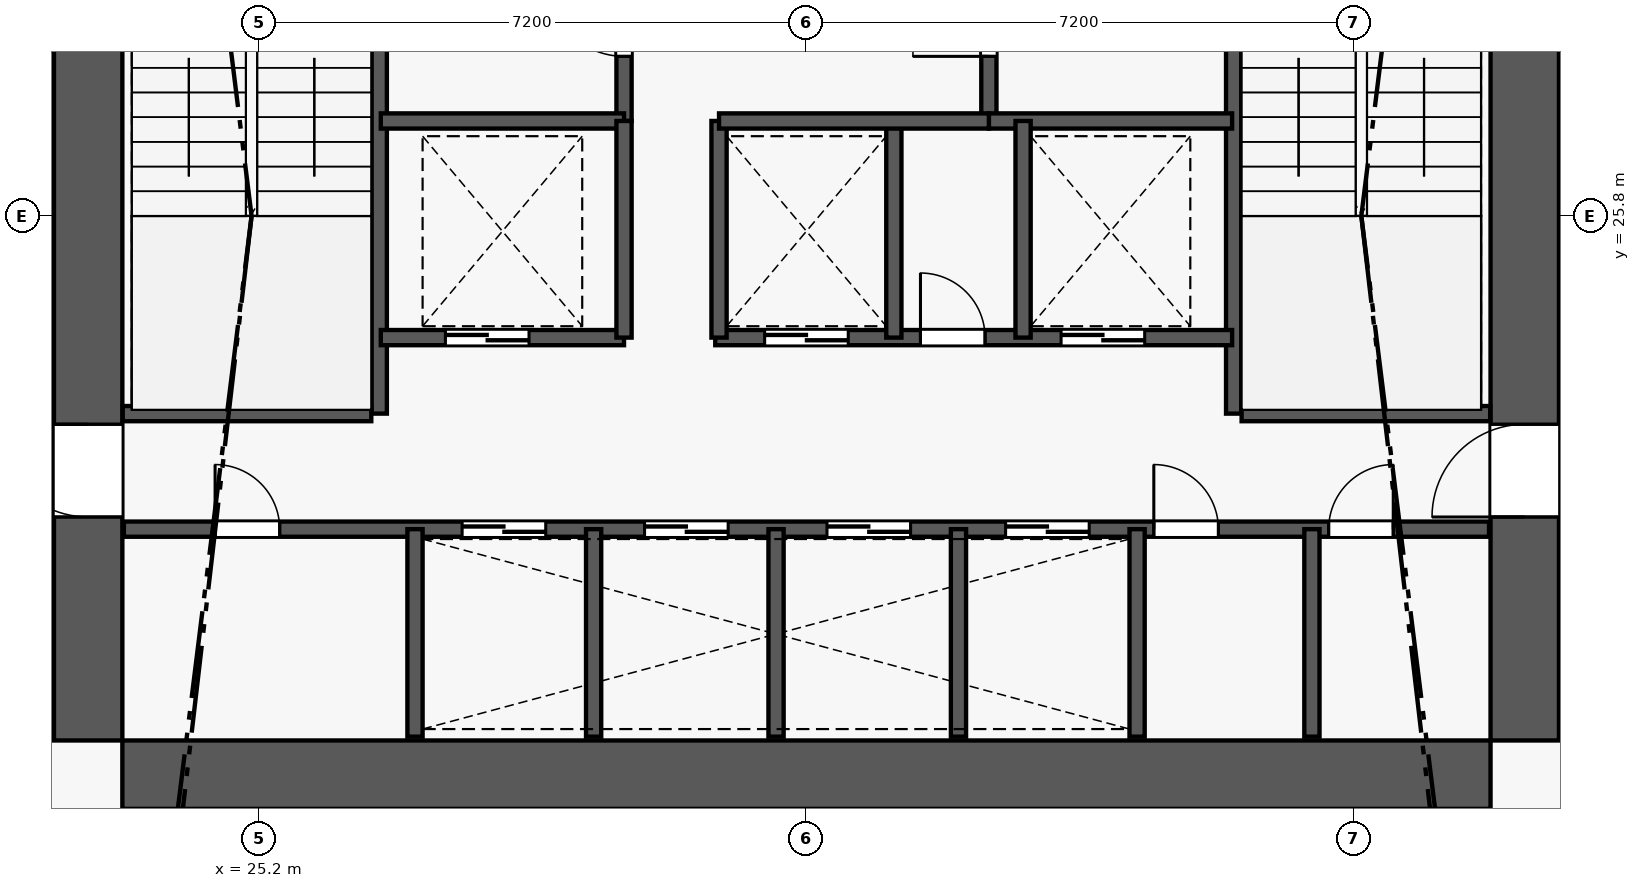
"""IFC4 building model, lengths in metres.
Left out: names, types, materials, properties, quantities, classifications, styles, units other than length and angle.
Written with IfcOpenShell. Run it as: python <this file> out.ifc"""

import sys

from ifc_helpers import new_model, si_unit, direction, frame, frame_2d, origin, origin_2d, place, context, subcontext, project, spatial, rectangle, extrude, element, fill, save


model = new_model("IFC4")
c1 = context("Model", 3, precision=1e-05, world=origin(), true_north=direction((0.0, 1.0)))
c2 = subcontext(c1, "Body", "Model", "MODEL_VIEW")
j1 = project(units=[si_unit("LENGTHUNIT", "METRE"), si_unit("PLANEANGLEUNIT", "RADIAN")], contexts=[c1])
p1 = place(None, origin())
s1 = spatial("IfcSite", under=j1, at=p1, CompositionType="ELEMENT")
p2 = place(p1, origin())
s2 = spatial("IfcBuilding", under=s1, at=p2, CompositionType="ELEMENT")
p3 = place(p2, origin())
s3 = spatial("IfcBuildingStorey", under=s2, at=p3, CompositionType="ELEMENT", Elevation=0.0)
for number, where, z_axis, x_axis in (
    (1, (22.95, 18.45, 0.0), (0.0, 0.0, 1.0), (1.0, 0.0, 0.0)),
    (2, (41.85, 18.45, 0.0), (0.0, 0.0, 1.0), (1.0, 0.0, 0.0)),
):
    element("IfcColumn", number, at=place(p3, frame(where, z_axis=z_axis, x_axis=x_axis)), inside=s3, PredefinedType="COLUMN", context=c2, shape_type="SweptSolid", body=[
        extrude(rectangle(XDim=0.9, YDim=0.9, at=origin_2d()), origin(), (0.0, 0.0, 1.0), 6.0),
    ])
p4 = place(p3, frame((23.4, 18.45, 0.0), z_axis=(0.0, 0.0, 1.0), x_axis=(1.0, 0.0, 0.0)))
e3 = element("IfcWall", 3, at=p4, inside=s3, PredefinedType="SHEAR", context=c2, shape_type="SweptSolid", body=[
    extrude(rectangle(XDim=18.0, YDim=0.9, at=frame_2d((9.0, 0.0))), origin(), (0.0, 0.0, 1.0), 5.75),
])
p5 = place(p3, frame((22.95, 18.9, 0.0), z_axis=(0.0, 0.0, 1.0), x_axis=(0.0, 1.0, 0.0)))
e4 = element("IfcWall", 4, at=p5, inside=s3, PredefinedType="SHEAR", context=c2, shape_type="SweptSolid", body=[
    extrude(rectangle(XDim=14.0, YDim=0.9, at=frame_2d((7.0, 0.0))), origin(), (0.0, 0.0, 1.0), 5.75),
])
p6 = place(p5, frame((2.94, 0.0, 0.0)))
e5 = element("IfcOpeningElement", 5, at=p6, cuts=e4, PredefinedType="OPENING", context=c2, shape_type="SweptSolid", body=[
    extrude(rectangle(XDim=1.22, YDim=2.25, at=frame_2d((0.61, 1.125))), frame((0.0, 0.46, 0.0), z_axis=(0.0, -1.0, 0.0), x_axis=(1.0, 0.0, 0.0)), (0.0, 0.0, 1.0), 0.92),
])
p7 = place(p3, frame((41.85, 18.9, 0.0), z_axis=(0.0, 0.0, 1.0), x_axis=(0.0, 1.0, 0.0)))
e6 = element("IfcWall", 6, at=p7, inside=s3, PredefinedType="SHEAR", context=c2, shape_type="SweptSolid", body=[
    extrude(rectangle(XDim=14.0, YDim=0.9, at=frame_2d((7.0, 0.0))), origin(), (0.0, 0.0, 1.0), 5.75),
])
p8 = place(p7, frame((2.94, 0.0, 0.0)))
e7 = element("IfcOpeningElement", 7, at=p8, cuts=e6, PredefinedType="OPENING", context=c2, shape_type="SweptSolid", body=[
    extrude(rectangle(XDim=1.22, YDim=2.25, at=frame_2d((0.61, 1.125))), frame((0.0, 0.46, 0.0), z_axis=(0.0, -1.0, 0.0), x_axis=(1.0, 0.0, 0.0)), (0.0, 0.0, 1.0), 0.92),
])
p9 = place(p3, frame((26.78, 23.2, 0.0), z_axis=(0.0, 0.0, 1.0), x_axis=(0.0, 1.0, 0.0)))
e8 = element("IfcWall", 8, at=p9, inside=s3, PredefinedType="SHEAR", context=c2, shape_type="SweptSolid", body=[
    extrude(rectangle(XDim=6.78, YDim=0.2, at=frame_2d((3.39, 0.0))), origin(), (0.0, 0.0, 1.0), 6.0),
])
p10 = place(p9, frame((5.32, 0.0, 0.0)))
e9 = element("IfcOpeningElement", 9, at=p10, cuts=e8, PredefinedType="OPENING", context=c2, shape_type="SweptSolid", body=[
    extrude(rectangle(XDim=1.05, YDim=2.15, at=frame_2d((0.525, 1.075))), frame((0.0, 0.11, 0.0), z_axis=(0.0, -1.0, 0.0), x_axis=(1.0, 0.0, 0.0)), (0.0, 0.0, 1.0), 0.22),
])
p11 = place(p3, frame((23.405, 23.2, 0.0), z_axis=(0.0, 0.0, 1.0), x_axis=(1.0, 0.0, 0.0)))
e10 = element("IfcWall", 10, at=p11, inside=s3, PredefinedType="PLUMBINGWALL", context=c2, shape_type="SweptSolid", body=[
    extrude(rectangle(XDim=3.27, YDim=0.2, at=frame_2d((1.635, 0.0))), origin(), (0.0, 0.0, 1.0), 5.75),
])
p12 = place(p3, frame((38.02, 23.2, 0.0), z_axis=(0.0, 0.0, 1.0), x_axis=(0.0, 1.0, 0.0)))
e11 = element("IfcWall", 11, at=p12, inside=s3, PredefinedType="SHEAR", context=c2, shape_type="SweptSolid", body=[
    extrude(rectangle(XDim=6.78, YDim=0.2, at=frame_2d((3.39, 0.0))), origin(), (0.0, 0.0, 1.0), 6.0),
])
p13 = place(p12, frame((5.32, 0.0, 0.0)))
e12 = element("IfcOpeningElement", 12, at=p13, cuts=e11, PredefinedType="OPENING", context=c2, shape_type="SweptSolid", body=[
    extrude(rectangle(XDim=1.05, YDim=2.15, at=frame_2d((0.525, 1.075))), frame((0.0, 0.11, 0.0), z_axis=(0.0, -1.0, 0.0), x_axis=(1.0, 0.0, 0.0)), (0.0, 0.0, 1.0), 0.22),
])
p14 = place(p3, frame((38.125, 23.2, 0.0), z_axis=(0.0, 0.0, 1.0), x_axis=(1.0, 0.0, 0.0)))
e13 = element("IfcWall", 13, at=p14, inside=s3, PredefinedType="PLUMBINGWALL", context=c2, shape_type="SweptSolid", body=[
    extrude(rectangle(XDim=3.27, YDim=0.2, at=frame_2d((1.635, 0.0))), origin(), (0.0, 0.0, 1.0), 5.75),
])
p15 = place(p3, frame((30.0, 27.05, 0.0), z_axis=(0.0, 0.0, 1.0), x_axis=(0.0, 1.0, 0.0)))
e14 = element("IfcWall", 14, at=p15, inside=s3, PredefinedType="PLUMBINGWALL", context=c2, shape_type="SweptSolid", body=[
    extrude(rectangle(XDim=2.75, YDim=0.2, at=frame_2d((1.375, 0.0))), origin(), (0.0, 0.0, 1.0), 5.75),
])
p16 = place(p15, frame((0.85, 0.0, 0.0)))
e15 = element("IfcOpeningElement", 15, at=p16, cuts=e14, PredefinedType="OPENING", context=c2, shape_type="SweptSolid", body=[
    extrude(rectangle(XDim=1.0, YDim=2.15, at=frame_2d((0.5, 1.075))), frame((0.0, 0.11, 0.0), z_axis=(0.0, -1.0, 0.0), x_axis=(1.0, 0.0, 0.0)), (0.0, 0.0, 1.0), 0.22),
])
p17 = place(p3, frame((26.8, 27.05, 0.0), z_axis=(0.0, 0.0, 1.0), x_axis=(1.0, 0.0, 0.0)))
e16 = element("IfcWall", 16, at=p17, inside=s3, PredefinedType="PLUMBINGWALL", context=c2, shape_type="SweptSolid", body=[
    extrude(rectangle(XDim=3.2, YDim=0.2, at=frame_2d((1.6, 0.0))), origin(), (0.0, 0.0, 1.0), 5.75),
])
p18 = place(p3, frame((34.8, 27.05, 0.0), z_axis=(0.0, 0.0, 1.0), x_axis=(0.0, 1.0, 0.0)))
e17 = element("IfcWall", 17, at=p18, inside=s3, PredefinedType="PLUMBINGWALL", context=c2, shape_type="SweptSolid", body=[
    extrude(rectangle(XDim=2.75, YDim=0.2, at=frame_2d((1.375, 0.0))), origin(), (0.0, 0.0, 1.0), 5.75),
])
p19 = place(p18, frame((0.85, 0.0, 0.0)))
e18 = element("IfcOpeningElement", 18, at=p19, cuts=e17, PredefinedType="OPENING", context=c2, shape_type="SweptSolid", body=[
    extrude(rectangle(XDim=1.0, YDim=2.15, at=frame_2d((0.5, 1.075))), frame((0.0, 0.11, 0.0), z_axis=(0.0, -1.0, 0.0), x_axis=(1.0, 0.0, 0.0)), (0.0, 0.0, 1.0), 0.22),
])
p20 = place(p3, frame((34.8, 27.05, 0.0), z_axis=(0.0, 0.0, 1.0), x_axis=(1.0, 0.0, 0.0)))
e19 = element("IfcWall", 19, at=p20, inside=s3, PredefinedType="PLUMBINGWALL", context=c2, shape_type="SweptSolid", body=[
    extrude(rectangle(XDim=3.2, YDim=0.2, at=frame_2d((1.6, 0.0))), origin(), (0.0, 0.0, 1.0), 5.75),
])
p21 = place(p3, frame((26.8, 24.2, 0.0), z_axis=(0.0, 0.0, 1.0), x_axis=(1.0, 0.0, 0.0)))
e20 = element("IfcWall", 20, at=p21, inside=s3, PredefinedType="PLUMBINGWALL", context=c2, shape_type="SweptSolid", body=[
    extrude(rectangle(XDim=3.2, YDim=0.2, at=frame_2d((1.6, 0.0))), origin(), (0.0, 0.0, 1.0), 5.75),
])
p22 = place(p21, frame((0.85, 0.0, 0.0)))
e21 = element("IfcOpeningElement", 21, at=p22, cuts=e20, PredefinedType="OPENING", context=c2, shape_type="SweptSolid", body=[
    extrude(rectangle(XDim=1.1, YDim=2.2, at=frame_2d((0.55, 1.1))), frame((0.0, 0.11, 0.0), z_axis=(0.0, -1.0, 0.0), x_axis=(1.0, 0.0, 0.0)), (0.0, 0.0, 1.0), 0.22),
])
p23 = place(p3, frame((30.0, 24.2, 0.0), z_axis=(0.0, 0.0, 1.0), x_axis=(0.0, 1.0, 0.0)))
e22 = element("IfcWall", 22, at=p23, inside=s3, PredefinedType="PLUMBINGWALL", context=c2, shape_type="SweptSolid", body=[
    extrude(rectangle(XDim=2.85, YDim=0.2, at=frame_2d((1.425, 0.0))), origin(), (0.0, 0.0, 1.0), 5.75),
])
p24 = place(p3, frame((31.2, 24.2, 0.0), z_axis=(0.0, 0.0, 1.0), x_axis=(1.0, 0.0, 0.0)))
e23 = element("IfcWall", 23, at=p24, inside=s3, PredefinedType="PLUMBINGWALL", context=c2, shape_type="SweptSolid", body=[
    extrude(rectangle(XDim=6.8, YDim=0.2, at=frame_2d((3.4, 0.0))), origin(), (0.0, 0.0, 1.0), 5.75),
])
p25 = place(p24, frame((0.65, 0.0, 0.0)))
e24 = element("IfcOpeningElement", 24, at=p25, cuts=e23, PredefinedType="OPENING", context=c2, shape_type="SweptSolid", body=[
    extrude(rectangle(XDim=1.1, YDim=2.2, at=frame_2d((0.55, 1.1))), frame((0.0, 0.11, 0.0), z_axis=(0.0, -1.0, 0.0), x_axis=(1.0, 0.0, 0.0)), (0.0, 0.0, 1.0), 0.22),
])
p26 = place(p24, frame((2.7, 0.0, 0.0)))
e25 = element("IfcOpeningElement", 25, at=p26, cuts=e23, PredefinedType="OPENING", context=c2, shape_type="SweptSolid", body=[
    extrude(rectangle(XDim=0.85, YDim=2.05, at=frame_2d((0.425, 1.025))), frame((0.0, 0.11, 0.0), z_axis=(0.0, -1.0, 0.0), x_axis=(1.0, 0.0, 0.0)), (0.0, 0.0, 1.0), 0.22),
])
p27 = place(p24, frame((4.55, 0.0, 0.0)))
e26 = element("IfcOpeningElement", 26, at=p27, cuts=e23, PredefinedType="OPENING", context=c2, shape_type="SweptSolid", body=[
    extrude(rectangle(XDim=1.1, YDim=2.2, at=frame_2d((0.55, 1.1))), frame((0.0, 0.11, 0.0), z_axis=(0.0, -1.0, 0.0), x_axis=(1.0, 0.0, 0.0)), (0.0, 0.0, 1.0), 0.22),
])
for number, where, z_axis, x_axis in (
    (27, (31.25, 24.2, 0.0), (0.0, 0.0, 1.0), (0.0, 1.0, 0.0)),
    (28, (33.55, 24.2, 0.0), (0.0, 0.0, 1.0), (0.0, 1.0, 0.0)),
    (29, (35.25, 24.2, 0.0), (0.0, 0.0, 1.0), (0.0, 1.0, 0.0)),
):
    element("IfcWall", number, at=place(p3, frame(where, z_axis=z_axis, x_axis=x_axis)), inside=s3, PredefinedType="PLUMBINGWALL", context=c2, shape_type="SweptSolid", body=[
        extrude(rectangle(XDim=2.85, YDim=0.2, at=frame_2d((1.425, 0.0))), origin(), (0.0, 0.0, 1.0), 5.75),
    ])
p28 = place(p3, frame((31.25, 27.05, 0.0), z_axis=(0.0, 0.0, 1.0), x_axis=(1.0, 0.0, 0.0)))
e30 = element("IfcWall", 30, at=p28, inside=s3, PredefinedType="PLUMBINGWALL", context=c2, shape_type="SweptSolid", body=[
    extrude(rectangle(XDim=3.55, YDim=0.2, at=frame_2d((1.775, 0.0))), origin(), (0.0, 0.0, 1.0), 5.75),
])
p29 = place(p3, frame((23.42, 21.68, 0.0), z_axis=(0.0, 0.0, 1.0), x_axis=(1.0, 0.0, 0.0)))
e31 = element("IfcWall", 31, at=p29, inside=s3, PredefinedType="PLUMBINGWALL", context=c2, shape_type="SweptSolid", body=[
    extrude(rectangle(XDim=17.96, YDim=0.2, at=frame_2d((8.98, 0.0))), origin(), (0.0, 0.0, 1.0), 5.75),
])
p30 = place(p29, frame((4.45, 0.0, 0.0)))
e32 = element("IfcOpeningElement", 32, at=p30, cuts=e31, PredefinedType="OPENING", context=c2, shape_type="SweptSolid", body=[
    extrude(rectangle(XDim=1.1, YDim=2.2, at=frame_2d((0.55, 1.1))), frame((0.0, 0.11, 0.0), z_axis=(0.0, -1.0, 0.0), x_axis=(1.0, 0.0, 0.0)), (0.0, 0.0, 1.0), 0.22),
])
p31 = place(p29, frame((6.85, 0.0, 0.0)))
e33 = element("IfcOpeningElement", 33, at=p31, cuts=e31, PredefinedType="OPENING", context=c2, shape_type="SweptSolid", body=[
    extrude(rectangle(XDim=1.1, YDim=2.2, at=frame_2d((0.55, 1.1))), frame((0.0, 0.11, 0.0), z_axis=(0.0, -1.0, 0.0), x_axis=(1.0, 0.0, 0.0)), (0.0, 0.0, 1.0), 0.22),
])
p32 = place(p29, frame((9.25, 0.0, 0.0)))
e34 = element("IfcOpeningElement", 34, at=p32, cuts=e31, PredefinedType="OPENING", context=c2, shape_type="SweptSolid", body=[
    extrude(rectangle(XDim=1.1, YDim=2.2, at=frame_2d((0.55, 1.1))), frame((0.0, 0.11, 0.0), z_axis=(0.0, -1.0, 0.0), x_axis=(1.0, 0.0, 0.0)), (0.0, 0.0, 1.0), 0.22),
])
p33 = place(p29, frame((11.6, 0.0, 0.0)))
e35 = element("IfcOpeningElement", 35, at=p33, cuts=e31, PredefinedType="OPENING", context=c2, shape_type="SweptSolid", body=[
    extrude(rectangle(XDim=1.1, YDim=2.2, at=frame_2d((0.55, 1.1))), frame((0.0, 0.11, 0.0), z_axis=(0.0, -1.0, 0.0), x_axis=(1.0, 0.0, 0.0)), (0.0, 0.0, 1.0), 0.22),
])
p34 = place(p29, frame((1.2, 0.0, 0.0)))
e36 = element("IfcOpeningElement", 36, at=p34, cuts=e31, PredefinedType="OPENING", context=c2, shape_type="SweptSolid", body=[
    extrude(rectangle(XDim=0.85, YDim=2.05, at=frame_2d((0.425, 1.025))), frame((0.0, 0.11, 0.0), z_axis=(0.0, -1.0, 0.0), x_axis=(1.0, 0.0, 0.0)), (0.0, 0.0, 1.0), 0.22),
])
p35 = place(p29, frame((13.55, 0.0, 0.0)))
e37 = element("IfcOpeningElement", 37, at=p35, cuts=e31, PredefinedType="OPENING", context=c2, shape_type="SweptSolid", body=[
    extrude(rectangle(XDim=0.85, YDim=2.05, at=frame_2d((0.425, 1.025))), frame((0.0, 0.11, 0.0), z_axis=(0.0, -1.0, 0.0), x_axis=(1.0, 0.0, 0.0)), (0.0, 0.0, 1.0), 0.22),
])
p36 = place(p29, frame((15.85, 0.0, 0.0)))
e38 = element("IfcOpeningElement", 38, at=p36, cuts=e31, PredefinedType="OPENING", context=c2, shape_type="SweptSolid", body=[
    extrude(rectangle(XDim=0.85, YDim=2.05, at=frame_2d((0.425, 1.025))), frame((0.0, 0.11, 0.0), z_axis=(0.0, -1.0, 0.0), x_axis=(1.0, 0.0, 0.0)), (0.0, 0.0, 1.0), 0.22),
])
for number, where, z_axis, x_axis in (
    (39, (27.25, 18.95, 0.0), (0.0, 0.0, 1.0), (0.0, 1.0, 0.0)),
    (40, (29.6, 18.95, 0.0), (0.0, 0.0, 1.0), (0.0, 1.0, 0.0)),
    (41, (32.0, 18.95, 0.0), (0.0, 0.0, 1.0), (0.0, 1.0, 0.0)),
    (42, (34.4, 18.95, 0.0), (0.0, 0.0, 1.0), (0.0, 1.0, 0.0)),
    (43, (36.75, 18.95, 0.0), (0.0, 0.0, 1.0), (0.0, 1.0, 0.0)),
    (44, (39.05, 18.95, 0.0), (0.0, 0.0, 1.0), (0.0, 1.0, 0.0)),
):
    element("IfcWall", number, at=place(p3, frame(where, z_axis=z_axis, x_axis=x_axis)), inside=s3, PredefinedType="PLUMBINGWALL", context=c2, shape_type="SweptSolid", body=[
        extrude(rectangle(XDim=2.73, YDim=0.2, at=frame_2d((1.365, 0.0))), origin(), (0.0, 0.0, 1.0), 5.75),
    ])
p37 = place(p6, origin())
e45 = element("IfcDoor", 45, at=p37, inside=s3, OperationType="SINGLE_SWING_RIGHT", PredefinedType="DOOR", context=c2, shape_type="SweptSolid", body=[
    extrude(rectangle(XDim=1.22, YDim=2.25, at=frame_2d((0.61, 1.125))), frame((0.0, 0.025, 0.0), z_axis=(0.0, -1.0, 0.0), x_axis=(1.0, 0.0, 0.0)), (0.0, 0.0, 1.0), 0.05),
])
fill(e5, e45)
p38 = place(p8, origin())
e46 = element("IfcDoor", 46, at=p38, inside=s3, OperationType="SINGLE_SWING_LEFT", PredefinedType="DOOR", context=c2, shape_type="SweptSolid", body=[
    extrude(rectangle(XDim=1.22, YDim=2.25, at=frame_2d((0.61, 1.125))), frame((0.0, 0.025, 0.0), z_axis=(0.0, -1.0, 0.0), x_axis=(1.0, 0.0, 0.0)), (0.0, 0.0, 1.0), 0.05),
])
fill(e7, e46)
p39 = place(p16, origin())
e47 = element("IfcDoor", 47, at=p39, inside=s3, OperationType="SINGLE_SWING_RIGHT", PredefinedType="DOOR", context=c2, shape_type="SweptSolid", body=[
    extrude(rectangle(XDim=1.0, YDim=2.15, at=frame_2d((0.5, 1.075))), frame((0.0, 0.025, 0.0), z_axis=(0.0, -1.0, 0.0), x_axis=(1.0, 0.0, 0.0)), (0.0, 0.0, 1.0), 0.05),
])
fill(e15, e47)
p40 = place(p19, origin())
e48 = element("IfcDoor", 48, at=p40, inside=s3, OperationType="SINGLE_SWING_LEFT", PredefinedType="DOOR", context=c2, shape_type="SweptSolid", body=[
    extrude(rectangle(XDim=1.0, YDim=2.15, at=frame_2d((0.5, 1.075))), frame((0.0, 0.025, 0.0), z_axis=(0.0, -1.0, 0.0), x_axis=(1.0, 0.0, 0.0)), (0.0, 0.0, 1.0), 0.05),
])
fill(e18, e48)
p41 = place(p22, origin())
e49 = element("IfcDoor", 49, at=p41, inside=s3, OperationType="DOUBLE_DOOR_SLIDING", PredefinedType="DOOR", context=c2, shape_type="SweptSolid", body=[
    extrude(rectangle(XDim=1.1, YDim=2.2, at=frame_2d((0.55, 1.1))), frame((0.0, 0.025, 0.0), z_axis=(0.0, -1.0, 0.0), x_axis=(1.0, 0.0, 0.0)), (0.0, 0.0, 1.0), 0.05),
])
fill(e21, e49)
p42 = place(p25, origin())
e50 = element("IfcDoor", 50, at=p42, inside=s3, OperationType="DOUBLE_DOOR_SLIDING", PredefinedType="DOOR", context=c2, shape_type="SweptSolid", body=[
    extrude(rectangle(XDim=1.1, YDim=2.2, at=frame_2d((0.55, 1.1))), frame((0.0, 0.025, 0.0), z_axis=(0.0, -1.0, 0.0), x_axis=(1.0, 0.0, 0.0)), (0.0, 0.0, 1.0), 0.05),
])
fill(e24, e50)
p43 = place(p26, origin())
e51 = element("IfcDoor", 51, at=p43, inside=s3, OperationType="SINGLE_SWING_LEFT", PredefinedType="DOOR", context=c2, shape_type="SweptSolid", body=[
    extrude(rectangle(XDim=0.85, YDim=2.05, at=frame_2d((0.425, 1.025))), frame((0.0, 0.025, 0.0), z_axis=(0.0, -1.0, 0.0), x_axis=(1.0, 0.0, 0.0)), (0.0, 0.0, 1.0), 0.05),
])
fill(e25, e51)
p44 = place(p27, origin())
e52 = element("IfcDoor", 52, at=p44, inside=s3, OperationType="DOUBLE_DOOR_SLIDING", PredefinedType="DOOR", context=c2, shape_type="SweptSolid", body=[
    extrude(rectangle(XDim=1.1, YDim=2.2, at=frame_2d((0.55, 1.1))), frame((0.0, 0.025, 0.0), z_axis=(0.0, -1.0, 0.0), x_axis=(1.0, 0.0, 0.0)), (0.0, 0.0, 1.0), 0.05),
])
fill(e26, e52)
p45 = place(p30, origin())
e53 = element("IfcDoor", 53, at=p45, inside=s3, OperationType="DOUBLE_DOOR_SLIDING", PredefinedType="DOOR", context=c2, shape_type="SweptSolid", body=[
    extrude(rectangle(XDim=1.1, YDim=2.2, at=frame_2d((0.55, 1.1))), frame((0.0, 0.025, 0.0), z_axis=(0.0, -1.0, 0.0), x_axis=(1.0, 0.0, 0.0)), (0.0, 0.0, 1.0), 0.05),
])
fill(e32, e53)
p46 = place(p31, origin())
e54 = element("IfcDoor", 54, at=p46, inside=s3, OperationType="DOUBLE_DOOR_SLIDING", PredefinedType="DOOR", context=c2, shape_type="SweptSolid", body=[
    extrude(rectangle(XDim=1.1, YDim=2.2, at=frame_2d((0.55, 1.1))), frame((0.0, 0.025, 0.0), z_axis=(0.0, -1.0, 0.0), x_axis=(1.0, 0.0, 0.0)), (0.0, 0.0, 1.0), 0.05),
])
fill(e33, e54)
p47 = place(p32, origin())
e55 = element("IfcDoor", 55, at=p47, inside=s3, OperationType="DOUBLE_DOOR_SLIDING", PredefinedType="DOOR", context=c2, shape_type="SweptSolid", body=[
    extrude(rectangle(XDim=1.1, YDim=2.2, at=frame_2d((0.55, 1.1))), frame((0.0, 0.025, 0.0), z_axis=(0.0, -1.0, 0.0), x_axis=(1.0, 0.0, 0.0)), (0.0, 0.0, 1.0), 0.05),
])
fill(e34, e55)
p48 = place(p33, origin())
e56 = element("IfcDoor", 56, at=p48, inside=s3, OperationType="DOUBLE_DOOR_SLIDING", PredefinedType="DOOR", context=c2, shape_type="SweptSolid", body=[
    extrude(rectangle(XDim=1.1, YDim=2.2, at=frame_2d((0.55, 1.1))), frame((0.0, 0.025, 0.0), z_axis=(0.0, -1.0, 0.0), x_axis=(1.0, 0.0, 0.0)), (0.0, 0.0, 1.0), 0.05),
])
fill(e35, e56)
p49 = place(p34, origin())
e57 = element("IfcDoor", 57, at=p49, inside=s3, OperationType="SINGLE_SWING_LEFT", PredefinedType="DOOR", context=c2, shape_type="SweptSolid", body=[
    extrude(rectangle(XDim=0.85, YDim=2.05, at=frame_2d((0.425, 1.025))), frame((0.0, 0.025, 0.0), z_axis=(0.0, -1.0, 0.0), x_axis=(1.0, 0.0, 0.0)), (0.0, 0.0, 1.0), 0.05),
])
fill(e36, e57)
p50 = place(p35, origin())
e58 = element("IfcDoor", 58, at=p50, inside=s3, OperationType="SINGLE_SWING_LEFT", PredefinedType="DOOR", context=c2, shape_type="SweptSolid", body=[
    extrude(rectangle(XDim=0.85, YDim=2.05, at=frame_2d((0.425, 1.025))), frame((0.0, 0.025, 0.0), z_axis=(0.0, -1.0, 0.0), x_axis=(1.0, 0.0, 0.0)), (0.0, 0.0, 1.0), 0.05),
])
fill(e37, e58)
p51 = place(p36, origin())
e59 = element("IfcDoor", 59, at=p51, inside=s3, OperationType="SINGLE_SWING_RIGHT", PredefinedType="DOOR", context=c2, shape_type="SweptSolid", body=[
    extrude(rectangle(XDim=0.85, YDim=2.05, at=frame_2d((0.425, 1.025))), frame((0.0, 0.025, 0.0), z_axis=(0.0, -1.0, 0.0), x_axis=(1.0, 0.0, 0.0)), (0.0, 0.0, 1.0), 0.05),
])
fill(e38, e59)
save(model, sys.argv[1])
